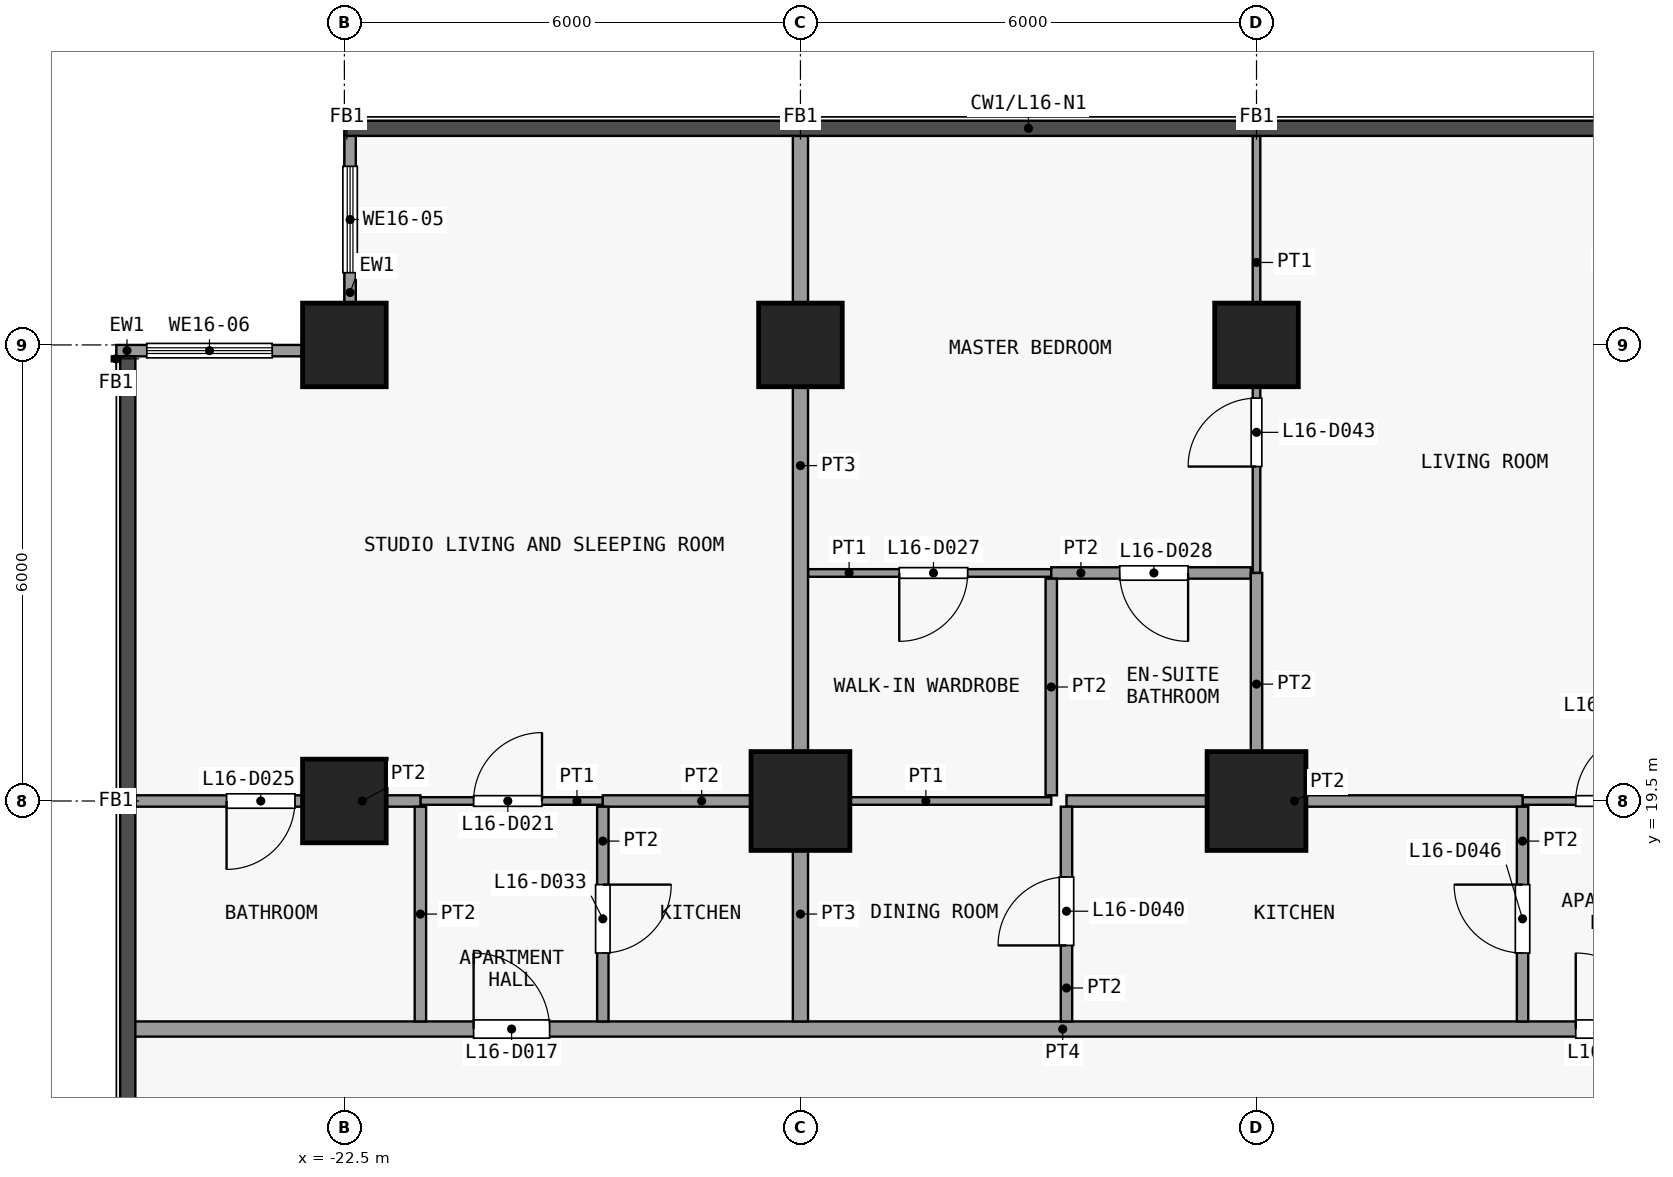
"""IFC4 building model, lengths in metres.
Left out: names, types, materials, properties, quantities, classifications, styles, units other than length and angle.
Written with IfcOpenShell. Run it as: python <this file> out.ifc"""

import sys

from ifc_helpers import new_model, si_unit, direction, frame, frame_2d, origin, origin_2d, place, context, subcontext, project, spatial, rectangle, extrude, element, fill, save


model = new_model("IFC4")
c1 = context("Model", 3, precision=1e-05, world=origin(), true_north=direction((0.0, 1.0)))
c2 = subcontext(c1, "Body", "Model", "MODEL_VIEW")
j1 = project(units=[si_unit("LENGTHUNIT", "METRE"), si_unit("PLANEANGLEUNIT", "RADIAN")], contexts=[c1])
p1 = place(None, origin())
s1 = spatial("IfcSite", under=j1, at=p1, CompositionType="ELEMENT")
p2 = place(p1, origin())
s2 = spatial("IfcBuilding", under=s1, at=p2, CompositionType="ELEMENT")
p3 = place(p2, frame((0.0, 0.0, 68.5)))
s3 = spatial("IfcBuildingStorey", under=s2, at=p3, CompositionType="ELEMENT", Elevation=68.5)
for number, where, z_axis, x_axis in (
    (1, (-22.5, 19.5, 0.0), (0.0, 0.0, 1.0), (1.0, 0.0, 0.0)),
    (2, (-22.5, 25.5, 0.0), (0.0, 0.0, 1.0), (1.0, 0.0, 0.0)),
):
    element("IfcColumn", number, at=place(p3, frame(where, z_axis=z_axis, x_axis=x_axis)), inside=s3, PredefinedType="COLUMN", context=c2, shape_type="SweptSolid", body=[
        extrude(rectangle(XDim=1.1, YDim=1.1, at=origin_2d()), origin(), (0.0, 0.0, 1.0), 3.6),
    ])
p4 = place(p3, frame((-16.5, 19.5, 0.0), z_axis=(0.0, 0.0, 1.0), x_axis=(1.0, 0.0, 0.0)))
e3 = element("IfcColumn", 3, at=p4, inside=s3, PredefinedType="COLUMN", context=c2, shape_type="SweptSolid", body=[
    extrude(rectangle(XDim=1.3, YDim=1.3, at=origin_2d()), origin(), (0.0, 0.0, 1.0), 3.6),
])
p5 = place(p3, frame((-16.5, 25.5, 0.0), z_axis=(0.0, 0.0, 1.0), x_axis=(1.0, 0.0, 0.0)))
e4 = element("IfcColumn", 4, at=p5, inside=s3, PredefinedType="COLUMN", context=c2, shape_type="SweptSolid", body=[
    extrude(rectangle(XDim=1.1, YDim=1.1, at=origin_2d()), origin(), (0.0, 0.0, 1.0), 3.6),
])
p6 = place(p3, frame((-10.5, 19.5, 0.0), z_axis=(0.0, 0.0, 1.0), x_axis=(1.0, 0.0, 0.0)))
e5 = element("IfcColumn", 5, at=p6, inside=s3, PredefinedType="COLUMN", context=c2, shape_type="SweptSolid", body=[
    extrude(rectangle(XDim=1.3, YDim=1.3, at=origin_2d()), origin(), (0.0, 0.0, 1.0), 3.6),
])
p7 = place(p3, frame((-10.5, 25.5, 0.0), z_axis=(0.0, 0.0, 1.0), x_axis=(1.0, 0.0, 0.0)))
e6 = element("IfcColumn", 6, at=p7, inside=s3, PredefinedType="COLUMN", context=c2, shape_type="SweptSolid", body=[
    extrude(rectangle(XDim=1.1, YDim=1.1, at=origin_2d()), origin(), (0.0, 0.0, 1.0), 3.6),
])
p8 = place(p3, frame((-22.425, 26.05, 0.0), z_axis=(0.0, 0.0, 1.0), x_axis=(0.0, 1.0, 0.0)))
e7 = element("IfcWall", 7, at=p8, inside=s3, PredefinedType="SOLIDWALL", context=c2, shape_type="SweptSolid", body=[
    extrude(rectangle(XDim=2.2, YDim=0.15, at=frame_2d((1.1, 0.0))), origin(), (0.0, 0.0, 1.0), 3.3),
])
p9 = place(p8, frame((0.4, 0.0, 0.9)))
e8 = element("IfcOpeningElement", 8, at=p9, cuts=e7, PredefinedType="OPENING", context=c2, shape_type="SweptSolid", body=[
    extrude(rectangle(XDim=1.4, YDim=2.4, at=frame_2d((0.7, 1.2))), frame((0.0, 0.085, 0.0), z_axis=(0.0, -1.0, 0.0), x_axis=(1.0, 0.0, 0.0)), (0.0, 0.0, 1.0), 0.17),
])
p10 = place(p3, frame((-25.5, 25.425, 0.0), z_axis=(0.0, 0.0, 1.0), x_axis=(1.0, 0.0, 0.0)))
e9 = element("IfcWall", 9, at=p10, inside=s3, PredefinedType="SOLIDWALL", context=c2, shape_type="SweptSolid", body=[
    extrude(rectangle(XDim=2.45, YDim=0.15, at=frame_2d((1.225, 0.0))), origin(), (0.0, 0.0, 1.0), 3.3),
])
p11 = place(p10, frame((0.4, 0.0, 0.9)))
e10 = element("IfcOpeningElement", 10, at=p11, cuts=e9, PredefinedType="OPENING", context=c2, shape_type="SweptSolid", body=[
    extrude(rectangle(XDim=1.65, YDim=2.4, at=frame_2d((0.825, 1.2))), frame((0.0, 0.085, 0.0), z_axis=(0.0, -1.0, 0.0), x_axis=(1.0, 0.0, 0.0)), (0.0, 0.0, 1.0), 0.17),
])
p12 = place(p3, frame((-25.35, 16.5, 0.0), z_axis=(0.0, 0.0, 1.0), x_axis=(1.0, 0.0, 0.0)))
e11 = element("IfcWall", 11, at=p12, inside=s3, PredefinedType="PARTITIONING", context=c2, shape_type="SweptSolid", body=[
    extrude(rectangle(XDim=50.7, YDim=0.2, at=frame_2d((25.35, 0.0))), origin(), (0.0, 0.0, 1.0), 3.3),
])
p13 = place(p12, frame((4.55, 0.0, 0.0)))
e12 = element("IfcOpeningElement", 12, at=p13, cuts=e11, PredefinedType="OPENING", context=c2, shape_type="SweptSolid", body=[
    extrude(rectangle(XDim=1.0, YDim=2.1, at=frame_2d((0.5, 1.05))), frame((0.0, 0.11, 0.0), z_axis=(0.0, -1.0, 0.0), x_axis=(1.0, 0.0, 0.0)), (0.0, 0.0, 1.0), 0.22),
])
p14 = place(p12, frame((19.05, 0.0, 0.0)))
e13 = element("IfcOpeningElement", 13, at=p14, cuts=e11, PredefinedType="OPENING", context=c2, shape_type="SweptSolid", body=[
    extrude(rectangle(XDim=1.0, YDim=2.1, at=frame_2d((0.5, 1.05))), frame((0.0, 0.11, 0.0), z_axis=(0.0, -1.0, 0.0), x_axis=(1.0, 0.0, 0.0)), (0.0, 0.0, 1.0), 0.22),
])
p15 = place(p12, frame((33.05, 0.0, 0.0)))
e14 = element("IfcOpeningElement", 14, at=p15, cuts=e11, PredefinedType="OPENING", context=c2, shape_type="SweptSolid", body=[
    extrude(rectangle(XDim=1.0, YDim=2.1, at=frame_2d((0.5, 1.05))), frame((0.0, 0.11, 0.0), z_axis=(0.0, -1.0, 0.0), x_axis=(1.0, 0.0, 0.0)), (0.0, 0.0, 1.0), 0.22),
])
p16 = place(p12, frame((45.05, 0.0, 0.0)))
e15 = element("IfcOpeningElement", 15, at=p16, cuts=e11, PredefinedType="OPENING", context=c2, shape_type="SweptSolid", body=[
    extrude(rectangle(XDim=1.0, YDim=2.1, at=frame_2d((0.5, 1.05))), frame((0.0, 0.11, 0.0), z_axis=(0.0, -1.0, 0.0), x_axis=(1.0, 0.0, 0.0)), (0.0, 0.0, 1.0), 0.22),
])
p17 = place(p3, frame((-21.5, 19.5, 0.0), z_axis=(0.0, 0.0, 1.0), x_axis=(1.0, 0.0, 0.0)))
e16 = element("IfcWall", 16, at=p17, inside=s3, PredefinedType="PARTITIONING", context=c2, shape_type="SweptSolid", body=[
    extrude(rectangle(XDim=2.4, YDim=0.1, at=frame_2d((1.2, 0.0))), origin(), (0.0, 0.0, 1.0), 3.3),
])
p18 = place(p17, frame((0.7, 0.0, 0.0)))
e17 = element("IfcOpeningElement", 17, at=p18, cuts=e16, PredefinedType="OPENING", context=c2, shape_type="SweptSolid", body=[
    extrude(rectangle(XDim=0.9, YDim=2.1, at=frame_2d((0.45, 1.05))), frame((0.0, 0.06, 0.0), z_axis=(0.0, -1.0, 0.0), x_axis=(1.0, 0.0, 0.0)), (0.0, 0.0, 1.0), 0.12),
])
p19 = place(p3, frame((-16.5, 19.5, 0.0), z_axis=(0.0, 0.0, 1.0), x_axis=(1.0, 0.0, 0.0)))
e18 = element("IfcWall", 18, at=p19, inside=s3, PredefinedType="PARTITIONING", context=c2, shape_type="SweptSolid", body=[
    extrude(rectangle(XDim=3.3, YDim=0.1, at=frame_2d((1.65, 0.0))), origin(), (0.0, 0.0, 1.0), 3.3),
])
p20 = place(p3, frame((-7.0, 19.5, 0.0), z_axis=(0.0, 0.0, 1.0), x_axis=(1.0, 0.0, 0.0)))
e19 = element("IfcWall", 19, at=p20, inside=s3, PredefinedType="PARTITIONING", context=c2, shape_type="SweptSolid", body=[
    extrude(rectangle(XDim=2.4, YDim=0.1, at=frame_2d((1.2, 0.0))), origin(), (0.0, 0.0, 1.0), 3.3),
])
p21 = place(p20, frame((0.7, 0.0, 0.0)))
e20 = element("IfcOpeningElement", 20, at=p21, cuts=e19, PredefinedType="OPENING", context=c2, shape_type="SweptSolid", body=[
    extrude(rectangle(XDim=0.9, YDim=2.1, at=frame_2d((0.45, 1.05))), frame((0.0, 0.06, 0.0), z_axis=(0.0, -1.0, 0.0), x_axis=(1.0, 0.0, 0.0)), (0.0, 0.0, 1.0), 0.12),
])
p22 = place(p3, frame((-25.25, 19.5, 0.0), z_axis=(0.0, 0.0, 1.0), x_axis=(1.0, 0.0, 0.0)))
e21 = element("IfcWall", 21, at=p22, inside=s3, PredefinedType="PARTITIONING", context=c2, shape_type="SweptSolid", body=[
    extrude(rectangle(XDim=3.75, YDim=0.15, at=frame_2d((1.875, 0.0))), origin(), (0.0, 0.0, 1.0), 3.3),
])
p23 = place(p22, frame((1.2, 0.0, 0.0)))
e22 = element("IfcOpeningElement", 22, at=p23, cuts=e21, PredefinedType="OPENING", context=c2, shape_type="SweptSolid", body=[
    extrude(rectangle(XDim=0.9, YDim=2.1, at=frame_2d((0.45, 1.05))), frame((0.0, 0.085, 0.0), z_axis=(0.0, -1.0, 0.0), x_axis=(1.0, 0.0, 0.0)), (0.0, 0.0, 1.0), 0.17),
])
p24 = place(p3, frame((-19.1, 19.5, 0.0), z_axis=(0.0, 0.0, 1.0), x_axis=(1.0, 0.0, 0.0)))
e23 = element("IfcWall", 23, at=p24, inside=s3, PredefinedType="PARTITIONING", context=c2, shape_type="SweptSolid", body=[
    extrude(rectangle(XDim=2.6, YDim=0.15, at=frame_2d((1.3, 0.0))), origin(), (0.0, 0.0, 1.0), 3.3),
])
p25 = place(p3, frame((-13.0, 19.5, 0.0), z_axis=(0.0, 0.0, 1.0), x_axis=(1.0, 0.0, 0.0)))
e24 = element("IfcWall", 24, at=p25, inside=s3, PredefinedType="PARTITIONING", context=c2, shape_type="SweptSolid", body=[
    extrude(rectangle(XDim=6.0, YDim=0.15, at=frame_2d((3.0, 0.0))), origin(), (0.0, 0.0, 1.0), 3.3),
])
p26 = place(p3, frame((-16.4, 22.5, 0.0), z_axis=(0.0, 0.0, 1.0), x_axis=(1.0, 0.0, 0.0)))
e25 = element("IfcWall", 25, at=p26, inside=s3, PredefinedType="PARTITIONING", context=c2, shape_type="SweptSolid", body=[
    extrude(rectangle(XDim=3.2, YDim=0.1, at=frame_2d((1.6, 0.0))), origin(), (0.0, 0.0, 1.0), 3.3),
])
p27 = place(p26, frame((1.2, 0.0, 0.0)))
e26 = element("IfcOpeningElement", 26, at=p27, cuts=e25, PredefinedType="OPENING", context=c2, shape_type="SweptSolid", body=[
    extrude(rectangle(XDim=0.9, YDim=2.1, at=frame_2d((0.45, 1.05))), frame((0.0, 0.06, 0.0), z_axis=(0.0, -1.0, 0.0), x_axis=(1.0, 0.0, 0.0)), (0.0, 0.0, 1.0), 0.12),
])
p28 = place(p3, frame((-13.2, 22.5, 0.0), z_axis=(0.0, 0.0, 1.0), x_axis=(1.0, 0.0, 0.0)))
e27 = element("IfcWall", 27, at=p28, inside=s3, PredefinedType="PARTITIONING", context=c2, shape_type="SweptSolid", body=[
    extrude(rectangle(XDim=2.625, YDim=0.15, at=frame_2d((1.312, 0.0))), origin(), (0.0, 0.0, 1.0), 3.3),
])
p29 = place(p28, frame((0.9, 0.0, 0.0)))
e28 = element("IfcOpeningElement", 28, at=p29, cuts=e27, PredefinedType="OPENING", context=c2, shape_type="SweptSolid", body=[
    extrude(rectangle(XDim=0.9, YDim=2.1, at=frame_2d((0.45, 1.05))), frame((0.0, 0.085, 0.0), z_axis=(0.0, -1.0, 0.0), x_axis=(1.0, 0.0, 0.0)), (0.0, 0.0, 1.0), 0.17),
])
p30 = place(p3, frame((-21.5, 16.6, 0.0), z_axis=(0.0, 0.0, 1.0), x_axis=(0.0, 1.0, 0.0)))
e29 = element("IfcWall", 29, at=p30, inside=s3, PredefinedType="PARTITIONING", context=c2, shape_type="SweptSolid", body=[
    extrude(rectangle(XDim=2.825, YDim=0.15, at=frame_2d((1.413, 0.0))), origin(), (0.0, 0.0, 1.0), 3.3),
])
p31 = place(p3, frame((-19.1, 16.6, 0.0), z_axis=(0.0, 0.0, 1.0), x_axis=(0.0, 1.0, 0.0)))
e30 = element("IfcWall", 30, at=p31, inside=s3, PredefinedType="PARTITIONING", context=c2, shape_type="SweptSolid", body=[
    extrude(rectangle(XDim=2.825, YDim=0.15, at=frame_2d((1.413, 0.0))), origin(), (0.0, 0.0, 1.0), 3.3),
])
p32 = place(p31, frame((0.9, 0.0, 0.0)))
e31 = element("IfcOpeningElement", 31, at=p32, cuts=e30, PredefinedType="OPENING", context=c2, shape_type="SweptSolid", body=[
    extrude(rectangle(XDim=0.9, YDim=2.1, at=frame_2d((0.45, 1.05))), frame((0.0, 0.085, 0.0), z_axis=(0.0, -1.0, 0.0), x_axis=(1.0, 0.0, 0.0)), (0.0, 0.0, 1.0), 0.17),
])
p33 = place(p3, frame((-16.5, 16.6, 0.0), z_axis=(0.0, 0.0, 1.0), x_axis=(0.0, 1.0, 0.0)))
e32 = element("IfcWall", 32, at=p33, inside=s3, PredefinedType="PARTITIONING", context=c2, shape_type="SweptSolid", body=[
    extrude(rectangle(XDim=2.825, YDim=0.2, at=frame_2d((1.413, 0.0))), origin(), (0.0, 0.0, 1.0), 3.3),
])
p34 = place(p3, frame((-16.5, 19.575, 0.0), z_axis=(0.0, 0.0, 1.0), x_axis=(0.0, 1.0, 0.0)))
e33 = element("IfcWall", 33, at=p34, inside=s3, PredefinedType="PARTITIONING", context=c2, shape_type="SweptSolid", body=[
    extrude(rectangle(XDim=8.675, YDim=0.2, at=frame_2d((4.337, 0.0))), origin(), (0.0, 0.0, 1.0), 3.3),
])
p35 = place(p3, frame((-13.2, 19.575, 0.0), z_axis=(0.0, 0.0, 1.0), x_axis=(0.0, 1.0, 0.0)))
e34 = element("IfcWall", 34, at=p35, inside=s3, PredefinedType="PARTITIONING", context=c2, shape_type="SweptSolid", body=[
    extrude(rectangle(XDim=2.85, YDim=0.15, at=frame_2d((1.425, 0.0))), origin(), (0.0, 0.0, 1.0), 3.3),
])
p36 = place(p3, frame((-13.0, 16.6, 0.0), z_axis=(0.0, 0.0, 1.0), x_axis=(0.0, 1.0, 0.0)))
e35 = element("IfcWall", 35, at=p36, inside=s3, PredefinedType="PARTITIONING", context=c2, shape_type="SweptSolid", body=[
    extrude(rectangle(XDim=2.825, YDim=0.15, at=frame_2d((1.413, 0.0))), origin(), (0.0, 0.0, 1.0), 3.3),
])
p37 = place(p36, frame((1.0, 0.0, 0.0)))
e36 = element("IfcOpeningElement", 36, at=p37, cuts=e35, PredefinedType="OPENING", context=c2, shape_type="SweptSolid", body=[
    extrude(rectangle(XDim=0.9, YDim=2.1, at=frame_2d((0.45, 1.05))), frame((0.0, 0.085, 0.0), z_axis=(0.0, -1.0, 0.0), x_axis=(1.0, 0.0, 0.0)), (0.0, 0.0, 1.0), 0.17),
])
p38 = place(p3, frame((-10.5, 22.5, 0.0), z_axis=(0.0, 0.0, 1.0), x_axis=(0.0, 1.0, 0.0)))
e37 = element("IfcWall", 37, at=p38, inside=s3, PredefinedType="PARTITIONING", context=c2, shape_type="SweptSolid", body=[
    extrude(rectangle(XDim=5.75, YDim=0.1, at=frame_2d((2.875, 0.0))), origin(), (0.0, 0.0, 1.0), 3.3),
])
p39 = place(p38, frame((1.4, 0.0, 0.0)))
e38 = element("IfcOpeningElement", 38, at=p39, cuts=e37, PredefinedType="OPENING", context=c2, shape_type="SweptSolid", body=[
    extrude(rectangle(XDim=0.9, YDim=2.1, at=frame_2d((0.45, 1.05))), frame((0.0, 0.06, 0.0), z_axis=(0.0, -1.0, 0.0), x_axis=(1.0, 0.0, 0.0)), (0.0, 0.0, 1.0), 0.12),
])
p40 = place(p3, frame((-10.5, 19.575, 0.0), z_axis=(0.0, 0.0, 1.0), x_axis=(0.0, 1.0, 0.0)))
e39 = element("IfcWall", 39, at=p40, inside=s3, PredefinedType="PARTITIONING", context=c2, shape_type="SweptSolid", body=[
    extrude(rectangle(XDim=2.925, YDim=0.15, at=frame_2d((1.462, 0.0))), origin(), (0.0, 0.0, 1.0), 3.3),
])
p41 = place(p3, frame((-7.0, 16.6, 0.0), z_axis=(0.0, 0.0, 1.0), x_axis=(0.0, 1.0, 0.0)))
e40 = element("IfcWall", 40, at=p41, inside=s3, PredefinedType="PARTITIONING", context=c2, shape_type="SweptSolid", body=[
    extrude(rectangle(XDim=2.825, YDim=0.15, at=frame_2d((1.413, 0.0))), origin(), (0.0, 0.0, 1.0), 3.3),
])
p42 = place(p41, frame((0.9, 0.0, 0.0)))
e41 = element("IfcOpeningElement", 41, at=p42, cuts=e40, PredefinedType="OPENING", context=c2, shape_type="SweptSolid", body=[
    extrude(rectangle(XDim=0.9, YDim=2.1, at=frame_2d((0.45, 1.05))), frame((0.0, 0.085, 0.0), z_axis=(0.0, -1.0, 0.0), x_axis=(1.0, 0.0, 0.0)), (0.0, 0.0, 1.0), 0.17),
])
p43 = place(p9, origin())
e42 = element("IfcWindow", 42, at=p43, inside=s3, PartitioningType="SINGLE_PANEL", PredefinedType="WINDOW", context=c2, shape_type="SweptSolid", body=[
    extrude(rectangle(XDim=1.4, YDim=2.4, at=frame_2d((0.7, 1.2))), frame((0.0, 0.03, 0.0), z_axis=(0.0, -1.0, 0.0), x_axis=(1.0, 0.0, 0.0)), (0.0, 0.0, 1.0), 0.06),
])
fill(e8, e42)
p44 = place(p11, origin())
e43 = element("IfcWindow", 43, at=p44, inside=s3, PartitioningType="SINGLE_PANEL", PredefinedType="WINDOW", context=c2, shape_type="SweptSolid", body=[
    extrude(rectangle(XDim=1.65, YDim=2.4, at=frame_2d((0.825, 1.2))), frame((0.0, 0.03, 0.0), z_axis=(0.0, -1.0, 0.0), x_axis=(1.0, 0.0, 0.0)), (0.0, 0.0, 1.0), 0.06),
])
fill(e10, e43)
p45 = place(p13, origin())
e44 = element("IfcDoor", 44, at=p45, inside=s3, OperationType="SINGLE_SWING_RIGHT", PredefinedType="DOOR", context=c2, shape_type="SweptSolid", body=[
    extrude(rectangle(XDim=1.0, YDim=2.1, at=frame_2d((0.5, 1.05))), frame((0.0, 0.025, 0.0), z_axis=(0.0, -1.0, 0.0), x_axis=(1.0, 0.0, 0.0)), (0.0, 0.0, 1.0), 0.05),
])
fill(e12, e44)
p46 = place(p14, origin())
e45 = element("IfcDoor", 45, at=p46, inside=s3, OperationType="SINGLE_SWING_RIGHT", PredefinedType="DOOR", context=c2, shape_type="SweptSolid", body=[
    extrude(rectangle(XDim=1.0, YDim=2.1, at=frame_2d((0.5, 1.05))), frame((0.0, 0.025, 0.0), z_axis=(0.0, -1.0, 0.0), x_axis=(1.0, 0.0, 0.0)), (0.0, 0.0, 1.0), 0.05),
])
fill(e13, e45)
p47 = place(p18, origin())
e46 = element("IfcDoor", 46, at=p47, inside=s3, OperationType="SINGLE_SWING_LEFT", PredefinedType="DOOR", context=c2, shape_type="SweptSolid", body=[
    extrude(rectangle(XDim=0.9, YDim=2.1, at=frame_2d((0.45, 1.05))), frame((0.0, 0.025, 0.0), z_axis=(0.0, -1.0, 0.0), x_axis=(1.0, 0.0, 0.0)), (0.0, 0.0, 1.0), 0.05),
])
fill(e17, e46)
p48 = place(p21, origin())
e47 = element("IfcDoor", 47, at=p48, inside=s3, OperationType="SINGLE_SWING_LEFT", PredefinedType="DOOR", context=c2, shape_type="SweptSolid", body=[
    extrude(rectangle(XDim=0.9, YDim=2.1, at=frame_2d((0.45, 1.05))), frame((0.0, 0.025, 0.0), z_axis=(0.0, -1.0, 0.0), x_axis=(1.0, 0.0, 0.0)), (0.0, 0.0, 1.0), 0.05),
])
fill(e20, e47)
p49 = place(p23, origin())
e48 = element("IfcDoor", 48, at=p49, inside=s3, OperationType="SINGLE_SWING_LEFT", PredefinedType="DOOR", context=c2, shape_type="SweptSolid", body=[
    extrude(rectangle(XDim=0.9, YDim=2.1, at=frame_2d((0.45, 1.05))), frame((0.0, 0.025, 0.0), z_axis=(0.0, -1.0, 0.0), x_axis=(1.0, 0.0, 0.0)), (0.0, 0.0, 1.0), 0.05),
])
fill(e22, e48)
p50 = place(p27, origin())
e49 = element("IfcDoor", 49, at=p50, inside=s3, OperationType="SINGLE_SWING_LEFT", PredefinedType="DOOR", context=c2, shape_type="SweptSolid", body=[
    extrude(rectangle(XDim=0.9, YDim=2.1, at=frame_2d((0.45, 1.05))), frame((0.0, 0.025, 0.0), z_axis=(0.0, -1.0, 0.0), x_axis=(1.0, 0.0, 0.0)), (0.0, 0.0, 1.0), 0.05),
])
fill(e26, e49)
p51 = place(p29, origin())
e50 = element("IfcDoor", 50, at=p51, inside=s3, OperationType="SINGLE_SWING_RIGHT", PredefinedType="DOOR", context=c2, shape_type="SweptSolid", body=[
    extrude(rectangle(XDim=0.9, YDim=2.1, at=frame_2d((0.45, 1.05))), frame((0.0, 0.025, 0.0), z_axis=(0.0, -1.0, 0.0), x_axis=(1.0, 0.0, 0.0)), (0.0, 0.0, 1.0), 0.05),
])
fill(e28, e50)
p52 = place(p32, origin())
e51 = element("IfcDoor", 51, at=p52, inside=s3, OperationType="SINGLE_SWING_RIGHT", PredefinedType="DOOR", context=c2, shape_type="SweptSolid", body=[
    extrude(rectangle(XDim=0.9, YDim=2.1, at=frame_2d((0.45, 1.05))), frame((0.0, 0.025, 0.0), z_axis=(0.0, -1.0, 0.0), x_axis=(1.0, 0.0, 0.0)), (0.0, 0.0, 1.0), 0.05),
])
fill(e31, e51)
p53 = place(p37, origin())
e52 = element("IfcDoor", 52, at=p53, inside=s3, OperationType="SINGLE_SWING_RIGHT", PredefinedType="DOOR", context=c2, shape_type="SweptSolid", body=[
    extrude(rectangle(XDim=0.9, YDim=2.1, at=frame_2d((0.45, 1.05))), frame((0.0, 0.025, 0.0), z_axis=(0.0, -1.0, 0.0), x_axis=(1.0, 0.0, 0.0)), (0.0, 0.0, 1.0), 0.05),
])
fill(e36, e52)
p54 = place(p39, origin())
e53 = element("IfcDoor", 53, at=p54, inside=s3, OperationType="SINGLE_SWING_RIGHT", PredefinedType="DOOR", context=c2, shape_type="SweptSolid", body=[
    extrude(rectangle(XDim=0.9, YDim=2.1, at=frame_2d((0.45, 1.05))), frame((0.0, 0.025, 0.0), z_axis=(0.0, -1.0, 0.0), x_axis=(1.0, 0.0, 0.0)), (0.0, 0.0, 1.0), 0.05),
])
fill(e38, e53)
p55 = place(p42, origin())
e54 = element("IfcDoor", 54, at=p55, inside=s3, OperationType="SINGLE_SWING_LEFT", PredefinedType="DOOR", context=c2, shape_type="SweptSolid", body=[
    extrude(rectangle(XDim=0.9, YDim=2.1, at=frame_2d((0.45, 1.05))), frame((0.0, 0.025, 0.0), z_axis=(0.0, -1.0, 0.0), x_axis=(1.0, 0.0, 0.0)), (0.0, 0.0, 1.0), 0.05),
])
fill(e41, e54)
save(model, sys.argv[1])
